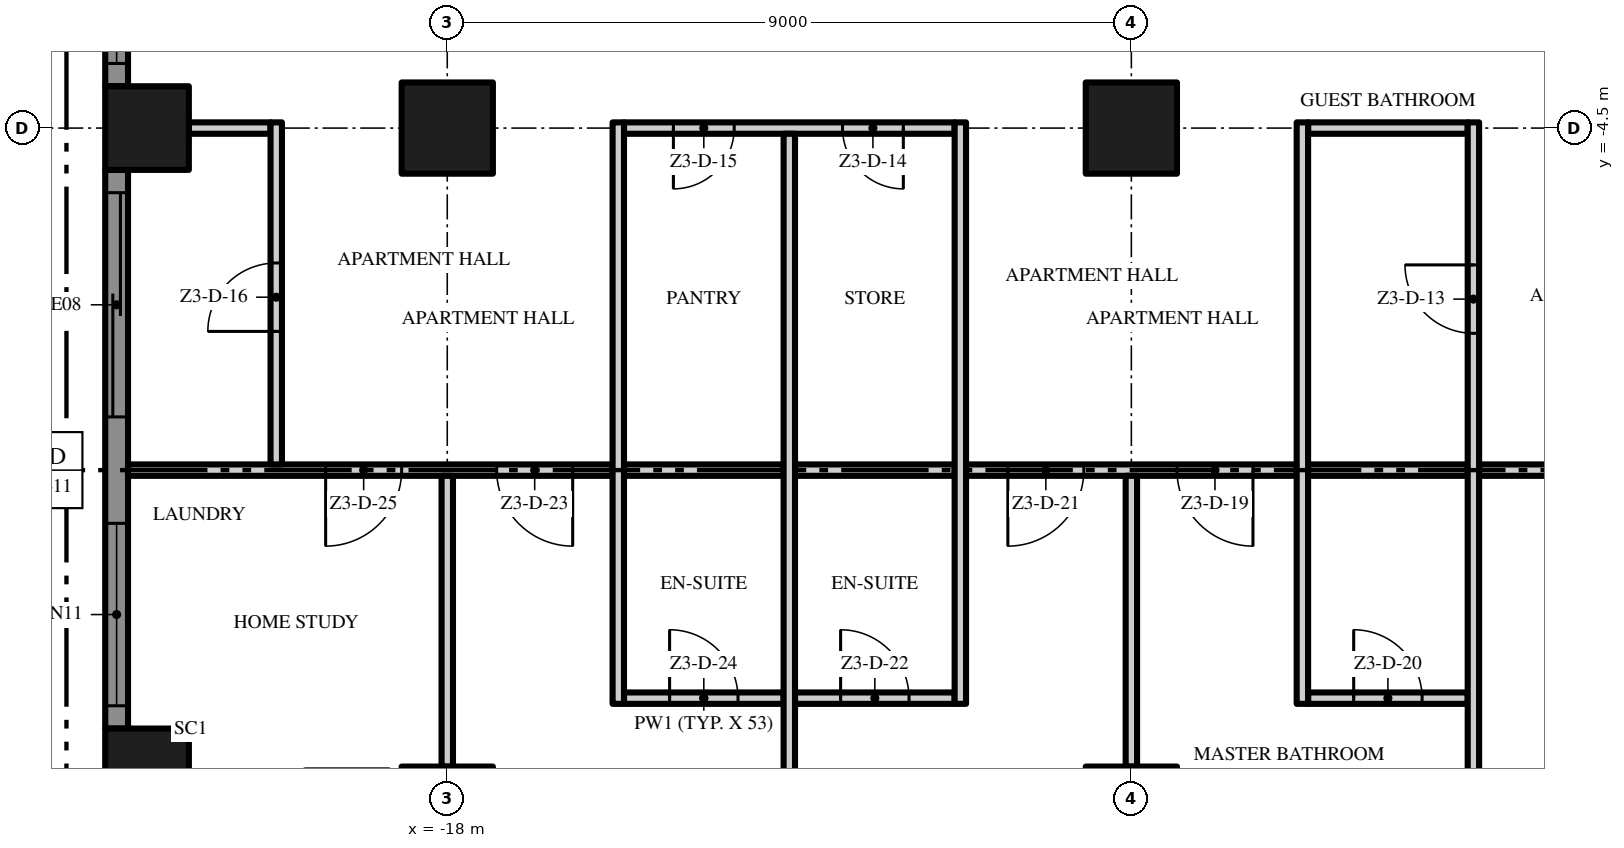
"""IFC4 building model, lengths in metres.
Left out: names, types, materials, properties, quantities, classifications, styles, units other than length and angle.
Written with IfcOpenShell. Run it as: python <this file> out.ifc"""

import sys

from ifc_helpers import new_model, si_unit, direction, frame, frame_2d, origin, origin_2d, place, context, subcontext, project, spatial, polyline, rectangle, outline, extrude, element, fill, save


model = new_model("IFC4")
c1 = context("Model", 3, precision=1e-05, world=origin(), true_north=direction((0.0, 1.0)))
c2 = subcontext(c1, "Body", "Model", "MODEL_VIEW")
j1 = project(units=[si_unit("LENGTHUNIT", "METRE"), si_unit("PLANEANGLEUNIT", "RADIAN")], contexts=[c1])
p1 = place(None, origin())
s1 = spatial("IfcSite", under=j1, at=p1, CompositionType="ELEMENT")
p2 = place(p1, origin())
s2 = spatial("IfcBuilding", under=s1, at=p2, CompositionType="ELEMENT")
p3 = place(p2, frame((0.0, 0.0, 163.0)))
s3 = spatial("IfcBuildingStorey", under=s2, at=p3, CompositionType="ELEMENT", Elevation=163.0)
for number, where, z_axis, x_axis in (
    (1, (-18.0, -13.5, 0.0), (0.0, 0.0, 1.0), (1.0, 0.0, 0.0)),
    (2, (-18.0, -4.5, 0.0), (0.0, 0.0, 1.0), (1.0, 0.0, 0.0)),
):
    element("IfcColumn", number, at=place(p3, frame(where, z_axis=z_axis, x_axis=x_axis)), inside=s3, PredefinedType="COLUMN", context=c2, shape_type="SweptSolid", body=[
        extrude(rectangle(XDim=1.2, YDim=1.2, at=origin_2d()), origin(), (0.0, 0.0, 1.0), 3.5),
    ])
for number, where, z_axis, x_axis in (
    (3, (-21.95, -12.95, 0.0), (0.0, 0.0, 1.0), (1.0, 0.0, 0.0)),
    (4, (-21.95, -4.5, 0.0), (0.0, 0.0, 1.0), (1.0, 0.0, 0.0)),
):
    element("IfcColumn", number, at=place(p3, frame(where, z_axis=z_axis, x_axis=x_axis)), inside=s3, PredefinedType="COLUMN", context=c2, shape_type="SweptSolid", body=[
        extrude(rectangle(XDim=1.1, YDim=1.1, at=origin_2d()), origin(), (0.0, 0.0, 1.0), 3.5),
    ])
for number, where, z_axis, x_axis in (
    (5, (-9.0, -13.5, 0.0), (0.0, 0.0, 1.0), (1.0, 0.0, 0.0)),
    (6, (-9.0, -4.5, 0.0), (0.0, 0.0, 1.0), (1.0, 0.0, 0.0)),
):
    element("IfcColumn", number, at=place(p3, frame(where, z_axis=z_axis, x_axis=x_axis)), inside=s3, PredefinedType="COLUMN", context=c2, shape_type="SweptSolid", body=[
        extrude(rectangle(XDim=1.2, YDim=1.2, at=origin_2d()), origin(), (0.0, 0.0, 1.0), 3.5),
    ])
p4 = place(p3, frame((-22.35, -3.95, 0.0), z_axis=(0.0, 0.0, 1.0), x_axis=(0.0, 1.0, 0.0)))
e7 = element("IfcWall", 7, at=p4, inside=s3, PredefinedType="SOLIDWALL", context=c2, shape_type="SweptSolid", body=[
    extrude(rectangle(XDim=7.9, YDim=0.3, at=frame_2d((3.95, 0.0))), origin(), (0.0, 0.0, 1.0), 3.5),
])
p5 = place(p4, frame((4.65, 0.0, 0.45)))
e8 = element("IfcOpeningElement", 8, at=p5, cuts=e7, PredefinedType="OPENING", context=c2, shape_type="SweptSolid", body=[
    extrude(rectangle(XDim=2.95, YDim=2.65, at=frame_2d((1.475, 1.325))), frame((0.0, 0.16, 0.0), z_axis=(0.0, -1.0, 0.0), x_axis=(1.0, 0.0, 0.0)), (0.0, 0.0, 1.0), 0.32),
])
p6 = place(p4, frame((0.3, 0.0, 0.45)))
e9 = element("IfcOpeningElement", 9, at=p6, cuts=e7, PredefinedType="OPENING", context=c2, shape_type="SweptSolid", body=[
    extrude(rectangle(XDim=2.95, YDim=2.65, at=frame_2d((1.475, 1.325))), frame((0.0, 0.16, 0.0), z_axis=(0.0, -1.0, 0.0), x_axis=(1.0, 0.0, 0.0)), (0.0, 0.0, 1.0), 0.32),
])
p7 = place(p3, frame((-22.35, -12.4, 0.0), z_axis=(0.0, 0.0, 1.0), x_axis=(0.0, 1.0, 0.0)))
e10 = element("IfcWall", 10, at=p7, inside=s3, PredefinedType="SOLIDWALL", context=c2, shape_type="SweptSolid", body=[
    extrude(rectangle(XDim=7.35, YDim=0.3, at=frame_2d((3.675, 0.0))), origin(), (0.0, 0.0, 1.0), 3.5),
])
p8 = place(p7, frame((4.1, 0.0, 0.0)))
e11 = element("IfcOpeningElement", 11, at=p8, cuts=e10, PredefinedType="OPENING", context=c2, shape_type="SweptSolid", body=[
    extrude(rectangle(XDim=2.95, YDim=2.4, at=frame_2d((1.475, 1.2))), frame((0.0, 0.16, 0.0), z_axis=(0.0, -1.0, 0.0), x_axis=(1.0, 0.0, 0.0)), (0.0, 0.0, 1.0), 0.32),
])
p9 = place(p7, frame((0.3, 0.0, 0.45)))
e12 = element("IfcOpeningElement", 12, at=p9, cuts=e10, PredefinedType="OPENING", context=c2, shape_type="SweptSolid", body=[
    extrude(rectangle(XDim=2.4, YDim=2.65, at=frame_2d((1.2, 1.325))), frame((0.0, 0.16, 0.0), z_axis=(0.0, -1.0, 0.0), x_axis=(1.0, 0.0, 0.0)), (0.0, 0.0, 1.0), 0.32),
])
p10 = place(p3, origin())
e13 = element("IfcWall", 13, at=p10, inside=s3, PredefinedType="USERDEFINED", context=c2, shape_type="SweptSolid", body=[
    extrude(outline(polyline([(-23.451, 18.0), (-23.115, 16.5), (-23.1, 16.125), (-23.231, 15.0), (-23.755, 13.5), (-24.488, 12.0), (-25.149, 10.5), (-25.485, 9.0), (-25.5, 8.625), (-25.369, 7.5), (-24.845, 6.0), (-24.112, 4.5), (-23.451, 3.0), (-23.115, 1.5), (-23.1, 1.125), (-23.231, 0.0), (-23.755, -1.5), (-24.488, -3.0), (-25.149, -4.5), (-25.485, -6.0), (-25.5, -6.375), (-25.369, -7.5), (-24.845, -9.0), (-24.112, -10.5), (-23.451, -12.0), (-23.115, -13.5), (-22.871, -13.445), (-23.213, -11.921), (-23.885, -10.395), (-24.614, -8.904), (-25.124, -7.444), (-25.249, -6.365), (-25.236, -6.033), (-24.91, -4.579), (-24.261, -3.105), (-23.524, -1.596), (-22.986, -0.056), (-22.849, 1.115), (-22.866, 1.533), (-23.213, 3.079), (-23.885, 4.605), (-24.614, 6.096), (-25.124, 7.556), (-25.249, 8.635), (-25.236, 8.967), (-24.91, 10.421), (-24.261, 11.895), (-23.524, 13.404), (-22.986, 14.944), (-22.849, 16.115), (-22.866, 16.533), (-23.208, 18.055), (-23.451, 18.0)])), origin(), (0.0, 0.0, 1.0), 0.9),
])
p11 = place(p3, frame((-15.675, -12.0, 0.0), z_axis=(0.0, 0.0, 1.0), x_axis=(1.0, 0.0, 0.0)))
e14 = element("IfcWall", 14, at=p11, inside=s3, PredefinedType="PARTITIONING", context=c2, shape_type="SweptSolid", body=[
    extrude(rectangle(XDim=2.1, YDim=0.15, at=frame_2d((1.05, 0.0))), origin(), (0.0, 0.0, 1.0), 3.5),
])
p12 = place(p11, frame((0.6, 0.0, 0.0)))
e15 = element("IfcOpeningElement", 15, at=p12, cuts=e14, PredefinedType="OPENING", context=c2, shape_type="SweptSolid", body=[
    extrude(rectangle(XDim=0.9, YDim=2.1, at=frame_2d((0.45, 1.05))), frame((0.0, 0.085, 0.0), z_axis=(0.0, -1.0, 0.0), x_axis=(1.0, 0.0, 0.0)), (0.0, 0.0, 1.0), 0.17),
])
p13 = place(p3, frame((-13.425, -12.0, 0.0), z_axis=(0.0, 0.0, 1.0), x_axis=(1.0, 0.0, 0.0)))
e16 = element("IfcWall", 16, at=p13, inside=s3, PredefinedType="PARTITIONING", context=c2, shape_type="SweptSolid", body=[
    extrude(rectangle(XDim=2.1, YDim=0.15, at=frame_2d((1.05, 0.0))), origin(), (0.0, 0.0, 1.0), 3.5),
])
p14 = place(p13, frame((0.6, 0.0, 0.0)))
e17 = element("IfcOpeningElement", 17, at=p14, cuts=e16, PredefinedType="OPENING", context=c2, shape_type="SweptSolid", body=[
    extrude(rectangle(XDim=0.9, YDim=2.1, at=frame_2d((0.45, 1.05))), frame((0.0, 0.085, 0.0), z_axis=(0.0, -1.0, 0.0), x_axis=(1.0, 0.0, 0.0)), (0.0, 0.0, 1.0), 0.17),
])
p15 = place(p3, frame((-6.675, -12.0, 0.0), z_axis=(0.0, 0.0, 1.0), x_axis=(1.0, 0.0, 0.0)))
e18 = element("IfcWall", 18, at=p15, inside=s3, PredefinedType="PARTITIONING", context=c2, shape_type="SweptSolid", body=[
    extrude(rectangle(XDim=2.1, YDim=0.15, at=frame_2d((1.05, 0.0))), origin(), (0.0, 0.0, 1.0), 3.5),
])
p16 = place(p15, frame((0.6, 0.0, 0.0)))
e19 = element("IfcOpeningElement", 19, at=p16, cuts=e18, PredefinedType="OPENING", context=c2, shape_type="SweptSolid", body=[
    extrude(rectangle(XDim=0.9, YDim=2.1, at=frame_2d((0.45, 1.05))), frame((0.0, 0.085, 0.0), z_axis=(0.0, -1.0, 0.0), x_axis=(1.0, 0.0, 0.0)), (0.0, 0.0, 1.0), 0.17),
])
p17 = place(p3, frame((-15.825, -9.0, 0.0), z_axis=(0.0, 0.0, 1.0), x_axis=(-1.0, 0.0, 0.0)))
e20 = element("IfcWall", 20, at=p17, inside=s3, PredefinedType="PARTITIONING", context=c2, shape_type="SweptSolid", body=[
    extrude(rectangle(XDim=6.375, YDim=0.15, at=frame_2d((3.188, 0.0))), origin(), (0.0, 0.0, 1.0), 3.5),
])
p18 = place(p17, frame((0.525, 0.0, 0.0)))
e21 = element("IfcOpeningElement", 21, at=p18, cuts=e20, PredefinedType="OPENING", context=c2, shape_type="SweptSolid", body=[
    extrude(rectangle(XDim=1.0, YDim=2.4, at=frame_2d((0.5, 1.2))), frame((0.0, 0.085, 0.0), z_axis=(0.0, -1.0, 0.0), x_axis=(1.0, 0.0, 0.0)), (0.0, 0.0, 1.0), 0.17),
])
p19 = place(p17, frame((2.775, 0.0, 0.0)))
e22 = element("IfcOpeningElement", 22, at=p19, cuts=e20, PredefinedType="OPENING", context=c2, shape_type="SweptSolid", body=[
    extrude(rectangle(XDim=1.0, YDim=2.4, at=frame_2d((0.5, 1.2))), frame((0.0, 0.085, 0.0), z_axis=(0.0, -1.0, 0.0), x_axis=(1.0, 0.0, 0.0)), (0.0, 0.0, 1.0), 0.17),
])
for number, where, z_axis, x_axis in (
    (23, (-15.675, -9.0, 0.0), (0.0, 0.0, 1.0), (1.0, 0.0, 0.0)),
    (24, (-13.425, -9.0, 0.0), (0.0, 0.0, 1.0), (1.0, 0.0, 0.0)),
):
    element("IfcWall", number, at=place(p3, frame(where, z_axis=z_axis, x_axis=x_axis)), inside=s3, PredefinedType="PARTITIONING", context=c2, shape_type="SweptSolid", body=[
        extrude(rectangle(XDim=2.1, YDim=0.15, at=frame_2d((1.05, 0.0))), origin(), (0.0, 0.0, 1.0), 3.5),
    ])
p20 = place(p3, frame((-6.825, -9.0, 0.0), z_axis=(0.0, 0.0, 1.0), x_axis=(-1.0, 0.0, 0.0)))
e25 = element("IfcWall", 25, at=p20, inside=s3, PredefinedType="PARTITIONING", context=c2, shape_type="SweptSolid", body=[
    extrude(rectangle(XDim=4.35, YDim=0.15, at=frame_2d((2.175, 0.0))), origin(), (0.0, 0.0, 1.0), 3.5),
])
p21 = place(p20, frame((0.575, 0.0, 0.0)))
e26 = element("IfcOpeningElement", 26, at=p21, cuts=e25, PredefinedType="OPENING", context=c2, shape_type="SweptSolid", body=[
    extrude(rectangle(XDim=1.0, YDim=2.4, at=frame_2d((0.5, 1.2))), frame((0.0, 0.085, 0.0), z_axis=(0.0, -1.0, 0.0), x_axis=(1.0, 0.0, 0.0)), (0.0, 0.0, 1.0), 0.17),
])
p22 = place(p20, frame((2.8, 0.0, 0.0)))
e27 = element("IfcOpeningElement", 27, at=p22, cuts=e25, PredefinedType="OPENING", context=c2, shape_type="SweptSolid", body=[
    extrude(rectangle(XDim=1.0, YDim=2.4, at=frame_2d((0.5, 1.2))), frame((0.0, 0.085, 0.0), z_axis=(0.0, -1.0, 0.0), x_axis=(1.0, 0.0, 0.0)), (0.0, 0.0, 1.0), 0.17),
])
p23 = place(p3, frame((-6.675, -9.0, 0.0), z_axis=(0.0, 0.0, 1.0), x_axis=(1.0, 0.0, 0.0)))
e28 = element("IfcWall", 28, at=p23, inside=s3, PredefinedType="PARTITIONING", context=c2, shape_type="SweptSolid", body=[
    extrude(rectangle(XDim=2.1, YDim=0.15, at=frame_2d((1.05, 0.0))), origin(), (0.0, 0.0, 1.0), 3.5),
])
p24 = place(p3, frame((4.4, -9.0, 0.0), z_axis=(0.0, 0.0, 1.0), x_axis=(-1.0, 0.0, 0.0)))
e29 = element("IfcWall", 29, at=p24, inside=s3, PredefinedType="PARTITIONING", context=c2, shape_type="SweptSolid", body=[
    extrude(rectangle(XDim=8.825, YDim=0.15, at=frame_2d((4.412, 0.0))), origin(), (0.0, 0.0, 1.0), 3.5),
])
p25 = place(p24, frame((6.125, 0.0, 0.0)))
e30 = element("IfcOpeningElement", 30, at=p25, cuts=e29, PredefinedType="OPENING", context=c2, shape_type="SweptSolid", body=[
    extrude(rectangle(XDim=1.8, YDim=2.4, at=frame_2d((0.9, 1.2))), frame((0.0, 0.085, 0.0), z_axis=(0.0, -1.0, 0.0), x_axis=(1.0, 0.0, 0.0)), (0.0, 0.0, 1.0), 0.17),
])
p26 = place(p3, frame((-21.4, -4.5, 0.0), z_axis=(0.0, 0.0, 1.0), x_axis=(1.0, 0.0, 0.0)))
e31 = element("IfcWall", 31, at=p26, inside=s3, PredefinedType="PARTITIONING", context=c2, shape_type="SweptSolid", body=[
    extrude(rectangle(XDim=1.075, YDim=0.15, at=frame_2d((0.537, 0.0))), origin(), (0.0, 0.0, 1.0), 3.5),
])
p27 = place(p3, frame((-11.325, -4.5, 0.0), z_axis=(0.0, 0.0, 1.0), x_axis=(-1.0, 0.0, 0.0)))
e32 = element("IfcWall", 32, at=p27, inside=s3, PredefinedType="PARTITIONING", context=c2, shape_type="SweptSolid", body=[
    extrude(rectangle(XDim=4.35, YDim=0.15, at=frame_2d((2.175, 0.0))), origin(), (0.0, 0.0, 1.0), 3.5),
])
p28 = place(p27, frame((0.675, 0.0, 0.0)))
e33 = element("IfcOpeningElement", 33, at=p28, cuts=e32, PredefinedType="OPENING", context=c2, shape_type="SweptSolid", body=[
    extrude(rectangle(XDim=0.8, YDim=2.0, at=frame_2d((0.4, 1.0))), frame((0.0, 0.085, 0.0), z_axis=(0.0, -1.0, 0.0), x_axis=(1.0, 0.0, 0.0)), (0.0, 0.0, 1.0), 0.17),
])
p29 = place(p27, frame((2.9, 0.0, 0.0)))
e34 = element("IfcOpeningElement", 34, at=p29, cuts=e32, PredefinedType="OPENING", context=c2, shape_type="SweptSolid", body=[
    extrude(rectangle(XDim=0.8, YDim=2.0, at=frame_2d((0.4, 1.0))), frame((0.0, 0.085, 0.0), z_axis=(0.0, -1.0, 0.0), x_axis=(1.0, 0.0, 0.0)), (0.0, 0.0, 1.0), 0.17),
])
p30 = place(p3, frame((-6.675, -4.5, 0.0), z_axis=(0.0, 0.0, 1.0), x_axis=(1.0, 0.0, 0.0)))
e35 = element("IfcWall", 35, at=p30, inside=s3, PredefinedType="PARTITIONING", context=c2, shape_type="SweptSolid", body=[
    extrude(rectangle(XDim=2.1, YDim=0.15, at=frame_2d((1.05, 0.0))), origin(), (0.0, 0.0, 1.0), 3.5),
])
p31 = place(p3, frame((-20.25, -8.925, 0.0), z_axis=(0.0, 0.0, 1.0), x_axis=(0.0, 1.0, 0.0)))
e36 = element("IfcWall", 36, at=p31, inside=s3, PredefinedType="PARTITIONING", context=c2, shape_type="SweptSolid", body=[
    extrude(rectangle(XDim=4.5, YDim=0.15, at=frame_2d((2.25, 0.0))), origin(), (0.0, 0.0, 1.0), 3.5),
])
p32 = place(p31, frame((1.75, 0.0, 0.0)))
e37 = element("IfcOpeningElement", 37, at=p32, cuts=e36, PredefinedType="OPENING", context=c2, shape_type="SweptSolid", body=[
    extrude(rectangle(XDim=0.9, YDim=2.1, at=frame_2d((0.45, 1.05))), frame((0.0, 0.085, 0.0), z_axis=(0.0, -1.0, 0.0), x_axis=(1.0, 0.0, 0.0)), (0.0, 0.0, 1.0), 0.17),
])
p33 = place(p3, frame((-18.0, -12.9, 0.0), z_axis=(0.0, 0.0, 1.0), x_axis=(0.0, 1.0, 0.0)))
e38 = element("IfcWall", 38, at=p33, inside=s3, PredefinedType="PARTITIONING", context=c2, shape_type="SweptSolid", body=[
    extrude(rectangle(XDim=3.825, YDim=0.15, at=frame_2d((1.913, 0.0))), origin(), (0.0, 0.0, 1.0), 3.5),
])
p34 = place(p3, frame((-15.75, -12.075, 0.0), z_axis=(0.0, 0.0, 1.0), x_axis=(0.0, 1.0, 0.0)))
e39 = element("IfcWall", 39, at=p34, inside=s3, PredefinedType="PARTITIONING", context=c2, shape_type="SweptSolid", body=[
    extrude(rectangle(XDim=7.65, YDim=0.15, at=frame_2d((3.825, 0.0))), origin(), (0.0, 0.0, 1.0), 3.5),
])
p35 = place(p3, frame((-13.5, -17.7, 0.0), z_axis=(0.0, 0.0, 1.0), x_axis=(0.0, 1.0, 0.0)))
e40 = element("IfcWall", 40, at=p35, inside=s3, PredefinedType="PARTITIONING", context=c2, shape_type="SweptSolid", body=[
    extrude(rectangle(XDim=13.125, YDim=0.15, at=frame_2d((6.562, 0.0))), origin(), (0.0, 0.0, 1.0), 3.5),
])
p36 = place(p3, frame((-11.25, -12.075, 0.0), z_axis=(0.0, 0.0, 1.0), x_axis=(0.0, 1.0, 0.0)))
e41 = element("IfcWall", 41, at=p36, inside=s3, PredefinedType="PARTITIONING", context=c2, shape_type="SweptSolid", body=[
    extrude(rectangle(XDim=7.65, YDim=0.15, at=frame_2d((3.825, 0.0))), origin(), (0.0, 0.0, 1.0), 3.5),
])
p37 = place(p3, frame((-9.0, -12.9, 0.0), z_axis=(0.0, 0.0, 1.0), x_axis=(0.0, 1.0, 0.0)))
e42 = element("IfcWall", 42, at=p37, inside=s3, PredefinedType="PARTITIONING", context=c2, shape_type="SweptSolid", body=[
    extrude(rectangle(XDim=3.825, YDim=0.15, at=frame_2d((1.913, 0.0))), origin(), (0.0, 0.0, 1.0), 3.5),
])
p38 = place(p3, frame((-6.75, -12.075, 0.0), z_axis=(0.0, 0.0, 1.0), x_axis=(0.0, 1.0, 0.0)))
e43 = element("IfcWall", 43, at=p38, inside=s3, PredefinedType="PARTITIONING", context=c2, shape_type="SweptSolid", body=[
    extrude(rectangle(XDim=7.65, YDim=0.15, at=frame_2d((3.825, 0.0))), origin(), (0.0, 0.0, 1.0), 3.5),
])
p39 = place(p3, frame((-4.5, -17.7, 0.0), z_axis=(0.0, 0.0, 1.0), x_axis=(0.0, 1.0, 0.0)))
e44 = element("IfcWall", 44, at=p39, inside=s3, PredefinedType="PARTITIONING", context=c2, shape_type="SweptSolid", body=[
    extrude(rectangle(XDim=13.275, YDim=0.15, at=frame_2d((6.638, 0.0))), origin(), (0.0, 0.0, 1.0), 3.5),
])
p40 = place(p39, frame((10.5, 0.0, 0.0)))
e45 = element("IfcOpeningElement", 45, at=p40, cuts=e44, PredefinedType="OPENING", context=c2, shape_type="SweptSolid", body=[
    extrude(rectangle(XDim=0.9, YDim=2.1, at=frame_2d((0.45, 1.05))), frame((0.0, 0.085, 0.0), z_axis=(0.0, -1.0, 0.0), x_axis=(1.0, 0.0, 0.0)), (0.0, 0.0, 1.0), 0.17),
])
p41 = place(p6, origin())
e46 = element("IfcWindow", 46, at=p41, inside=s3, PartitioningType="SINGLE_PANEL", PredefinedType="WINDOW", context=c2, shape_type="SweptSolid", body=[
    extrude(rectangle(XDim=2.95, YDim=2.65, at=frame_2d((1.475, 1.325))), frame((0.0, 0.03, 0.0), z_axis=(0.0, -1.0, 0.0), x_axis=(1.0, 0.0, 0.0)), (0.0, 0.0, 1.0), 0.06),
])
fill(e9, e46)
p42 = place(p8, origin())
e47 = element("IfcDoor", 47, at=p42, inside=s3, OperationType="SINGLE_SWING_LEFT", PredefinedType="DOOR", context=c2, shape_type="SweptSolid", body=[
    extrude(rectangle(XDim=2.95, YDim=2.4, at=frame_2d((1.475, 1.2))), frame((0.0, 0.025, 0.0), z_axis=(0.0, -1.0, 0.0), x_axis=(1.0, 0.0, 0.0)), (0.0, 0.0, 1.0), 0.05),
])
fill(e11, e47)
p43 = place(p9, origin())
e48 = element("IfcWindow", 48, at=p43, inside=s3, PartitioningType="SINGLE_PANEL", PredefinedType="WINDOW", context=c2, shape_type="SweptSolid", body=[
    extrude(rectangle(XDim=2.4, YDim=2.65, at=frame_2d((1.2, 1.325))), frame((0.0, 0.03, 0.0), z_axis=(0.0, -1.0, 0.0), x_axis=(1.0, 0.0, 0.0)), (0.0, 0.0, 1.0), 0.06),
])
fill(e12, e48)
p44 = place(p40, origin())
e49 = element("IfcDoor", 49, at=p44, inside=s3, OperationType="SINGLE_SWING_RIGHT", PredefinedType="DOOR", context=c2, shape_type="SweptSolid", body=[
    extrude(rectangle(XDim=0.9, YDim=2.1, at=frame_2d((0.45, 1.05))), frame((0.0, 0.025, 0.0), z_axis=(0.0, -1.0, 0.0), x_axis=(1.0, 0.0, 0.0)), (0.0, 0.0, 1.0), 0.05),
])
fill(e45, e49)
p45 = place(p28, origin())
e50 = element("IfcDoor", 50, at=p45, inside=s3, OperationType="SINGLE_SWING_LEFT", PredefinedType="DOOR", context=c2, shape_type="SweptSolid", body=[
    extrude(rectangle(XDim=0.8, YDim=2.0, at=frame_2d((0.4, 1.0))), frame((0.0, 0.025, 0.0), z_axis=(0.0, -1.0, 0.0), x_axis=(1.0, 0.0, 0.0)), (0.0, 0.0, 1.0), 0.05),
])
fill(e33, e50)
p46 = place(p29, origin())
e51 = element("IfcDoor", 51, at=p46, inside=s3, OperationType="SINGLE_SWING_RIGHT", PredefinedType="DOOR", context=c2, shape_type="SweptSolid", body=[
    extrude(rectangle(XDim=0.8, YDim=2.0, at=frame_2d((0.4, 1.0))), frame((0.0, 0.025, 0.0), z_axis=(0.0, -1.0, 0.0), x_axis=(1.0, 0.0, 0.0)), (0.0, 0.0, 1.0), 0.05),
])
fill(e34, e51)
p47 = place(p32, origin())
e52 = element("IfcDoor", 52, at=p47, inside=s3, OperationType="SINGLE_SWING_LEFT", PredefinedType="DOOR", context=c2, shape_type="SweptSolid", body=[
    extrude(rectangle(XDim=0.9, YDim=2.1, at=frame_2d((0.45, 1.05))), frame((0.0, 0.025, 0.0), z_axis=(0.0, -1.0, 0.0), x_axis=(1.0, 0.0, 0.0)), (0.0, 0.0, 1.0), 0.05),
])
fill(e37, e52)
p48 = place(p21, origin())
e53 = element("IfcDoor", 53, at=p48, inside=s3, OperationType="SINGLE_SWING_LEFT", PredefinedType="DOOR", context=c2, shape_type="SweptSolid", body=[
    extrude(rectangle(XDim=1.0, YDim=2.4, at=frame_2d((0.5, 1.2))), frame((0.0, 0.025, 0.0), z_axis=(0.0, -1.0, 0.0), x_axis=(1.0, 0.0, 0.0)), (0.0, 0.0, 1.0), 0.05),
])
fill(e26, e53)
p49 = place(p16, origin())
e54 = element("IfcDoor", 54, at=p49, inside=s3, OperationType="SINGLE_SWING_LEFT", PredefinedType="DOOR", context=c2, shape_type="SweptSolid", body=[
    extrude(rectangle(XDim=0.9, YDim=2.1, at=frame_2d((0.45, 1.05))), frame((0.0, 0.025, 0.0), z_axis=(0.0, -1.0, 0.0), x_axis=(1.0, 0.0, 0.0)), (0.0, 0.0, 1.0), 0.05),
])
fill(e19, e54)
p50 = place(p22, origin())
e55 = element("IfcDoor", 55, at=p50, inside=s3, OperationType="SINGLE_SWING_RIGHT", PredefinedType="DOOR", context=c2, shape_type="SweptSolid", body=[
    extrude(rectangle(XDim=1.0, YDim=2.4, at=frame_2d((0.5, 1.2))), frame((0.0, 0.025, 0.0), z_axis=(0.0, -1.0, 0.0), x_axis=(1.0, 0.0, 0.0)), (0.0, 0.0, 1.0), 0.05),
])
fill(e27, e55)
p51 = place(p14, origin())
e56 = element("IfcDoor", 56, at=p51, inside=s3, OperationType="SINGLE_SWING_LEFT", PredefinedType="DOOR", context=c2, shape_type="SweptSolid", body=[
    extrude(rectangle(XDim=0.9, YDim=2.1, at=frame_2d((0.45, 1.05))), frame((0.0, 0.025, 0.0), z_axis=(0.0, -1.0, 0.0), x_axis=(1.0, 0.0, 0.0)), (0.0, 0.0, 1.0), 0.05),
])
fill(e17, e56)
p52 = place(p18, origin())
e57 = element("IfcDoor", 57, at=p52, inside=s3, OperationType="SINGLE_SWING_LEFT", PredefinedType="DOOR", context=c2, shape_type="SweptSolid", body=[
    extrude(rectangle(XDim=1.0, YDim=2.4, at=frame_2d((0.5, 1.2))), frame((0.0, 0.025, 0.0), z_axis=(0.0, -1.0, 0.0), x_axis=(1.0, 0.0, 0.0)), (0.0, 0.0, 1.0), 0.05),
])
fill(e21, e57)
p53 = place(p12, origin())
e58 = element("IfcDoor", 58, at=p53, inside=s3, OperationType="SINGLE_SWING_LEFT", PredefinedType="DOOR", context=c2, shape_type="SweptSolid", body=[
    extrude(rectangle(XDim=0.9, YDim=2.1, at=frame_2d((0.45, 1.05))), frame((0.0, 0.025, 0.0), z_axis=(0.0, -1.0, 0.0), x_axis=(1.0, 0.0, 0.0)), (0.0, 0.0, 1.0), 0.05),
])
fill(e15, e58)
p54 = place(p19, origin())
e59 = element("IfcDoor", 59, at=p54, inside=s3, OperationType="SINGLE_SWING_RIGHT", PredefinedType="DOOR", context=c2, shape_type="SweptSolid", body=[
    extrude(rectangle(XDim=1.0, YDim=2.4, at=frame_2d((0.5, 1.2))), frame((0.0, 0.025, 0.0), z_axis=(0.0, -1.0, 0.0), x_axis=(1.0, 0.0, 0.0)), (0.0, 0.0, 1.0), 0.05),
])
fill(e22, e59)
save(model, sys.argv[1])
